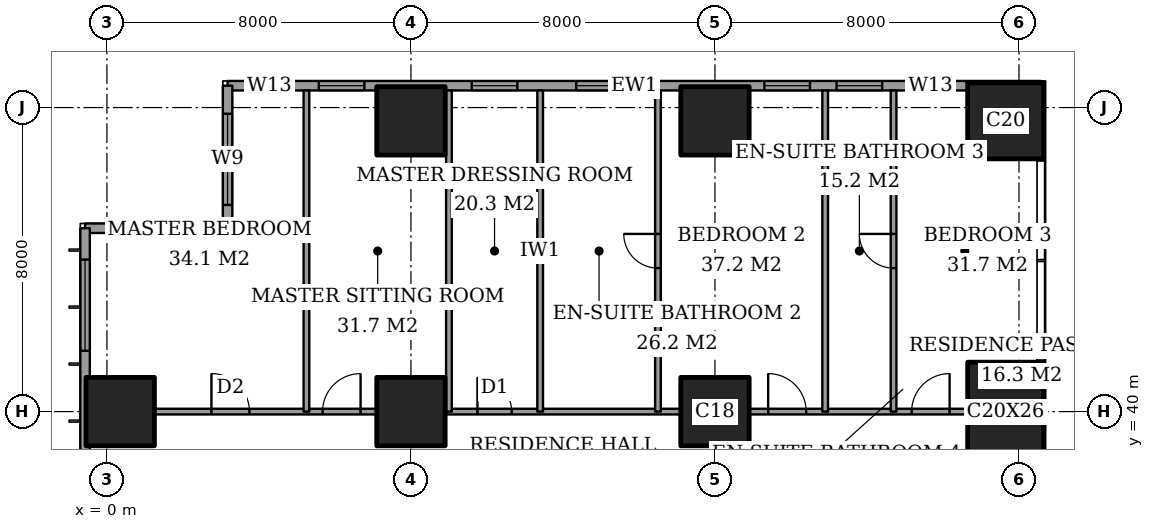
"""IFC4 building model, lengths in metres.
Left out: names, types, materials, properties, quantities, classifications, styles, units other than length and angle.
Written with IfcOpenShell. Run it as: python <this file> out.ifc"""

import sys

from ifc_helpers import new_model, si_unit, direction, frame, frame_2d, origin, origin_2d, place, context, subcontext, project, spatial, rectangle, extrude, element, fill, save


model = new_model("IFC4")
c1 = context("Model", 3, precision=1e-05, world=origin(), true_north=direction((0.0, 1.0)))
c2 = subcontext(c1, "Body", "Model", "MODEL_VIEW")
j1 = project(units=[si_unit("LENGTHUNIT", "METRE"), si_unit("PLANEANGLEUNIT", "RADIAN")], contexts=[c1])
p1 = place(None, origin())
s1 = spatial("IfcSite", under=j1, at=p1, CompositionType="ELEMENT")
p2 = place(p1, origin())
s2 = spatial("IfcBuilding", under=s1, at=p2, CompositionType="ELEMENT")
p3 = place(p2, frame((0.0, 0.0, 189.4)))
s3 = spatial("IfcBuildingStorey", under=s2, at=p3, CompositionType="ELEMENT", Elevation=189.4)
for number, where, z_axis, x_axis in (
    (1, (0.35, 40.0, 0.0), (0.0, 0.0, 1.0), (1.0, 0.0, 0.0)),
    (2, (8.0, 40.0, 0.0), (0.0, 0.0, 1.0), (1.0, 0.0, 0.0)),
    (3, (8.0, 47.65, 0.0), (0.0, 0.0, 1.0), (1.0, 0.0, 0.0)),
    (4, (16.0, 40.0, 0.0), (0.0, 0.0, 1.0), (1.0, 0.0, 0.0)),
    (5, (16.0, 47.65, 0.0), (0.0, 0.0, 1.0), (1.0, 0.0, 0.0)),
):
    element("IfcColumn", number, at=place(p3, frame(where, z_axis=z_axis, x_axis=x_axis)), inside=s3, PredefinedType="COLUMN", context=c2, shape_type="SweptSolid", body=[
        extrude(rectangle(XDim=1.8, YDim=1.8, at=origin_2d()), origin(), (0.0, 0.0, 1.0), 3.6),
    ])
p4 = place(p3, frame((23.65, 40.0, 0.0), z_axis=(0.0, 0.0, 1.0), x_axis=(1.0, 0.0, 0.0)))
e6 = element("IfcColumn", 6, at=p4, inside=s3, PredefinedType="COLUMN", context=c2, shape_type="SweptSolid", body=[
    extrude(rectangle(XDim=2.0, YDim=2.6, at=origin_2d()), origin(), (0.0, 0.0, 1.0), 3.6),
])
p5 = place(p3, frame((23.65, 47.65, 0.0), z_axis=(0.0, 0.0, 1.0), x_axis=(1.0, 0.0, 0.0)))
e7 = element("IfcColumn", 7, at=p5, inside=s3, PredefinedType="COLUMN", context=c2, shape_type="SweptSolid", body=[
    extrude(rectangle(XDim=2.0, YDim=2.0, at=origin_2d()), origin(), (0.0, 0.0, 1.0), 3.6),
])
p6 = place(p3, frame((24.575, 48.575, 0.0), z_axis=(0.0, 0.0, 1.0), x_axis=(-1.0, 0.0, 0.0)))
e8 = element("IfcWall", 8, at=p6, inside=s3, PredefinedType="SOLIDWALL", context=c2, shape_type="SweptSolid", body=[
    extrude(rectangle(XDim=21.4, YDim=0.25, at=frame_2d((10.7, 0.0))), origin(), (0.0, 0.0, 1.0), 3.6),
])
p7 = place(p6, frame((2.3, 0.0, 0.2)))
e9 = element("IfcOpeningElement", 9, at=p7, cuts=e8, PredefinedType="OPENING", context=c2, shape_type="SweptSolid", body=[
    extrude(rectangle(XDim=1.2, YDim=2.4, at=frame_2d((0.6, 1.2))), frame((0.0, 0.135, 0.0), z_axis=(0.0, -1.0, 0.0), x_axis=(1.0, 0.0, 0.0)), (0.0, 0.0, 1.0), 0.27),
])
p8 = place(p6, frame((4.175, 0.0, 0.2)))
e10 = element("IfcOpeningElement", 10, at=p8, cuts=e8, PredefinedType="OPENING", context=c2, shape_type="SweptSolid", body=[
    extrude(rectangle(XDim=1.2, YDim=2.4, at=frame_2d((0.6, 1.2))), frame((0.0, 0.135, 0.0), z_axis=(0.0, -1.0, 0.0), x_axis=(1.0, 0.0, 0.0)), (0.0, 0.0, 1.0), 0.27),
])
p9 = place(p6, frame((6.075, 0.0, 0.2)))
e11 = element("IfcOpeningElement", 11, at=p9, cuts=e8, PredefinedType="OPENING", context=c2, shape_type="SweptSolid", body=[
    extrude(rectangle(XDim=1.2, YDim=2.4, at=frame_2d((0.6, 1.2))), frame((0.0, 0.135, 0.0), z_axis=(0.0, -1.0, 0.0), x_axis=(1.0, 0.0, 0.0)), (0.0, 0.0, 1.0), 0.27),
])
p10 = place(p6, frame((11.025, 0.0, 0.2)))
e12 = element("IfcOpeningElement", 12, at=p10, cuts=e8, PredefinedType="OPENING", context=c2, shape_type="SweptSolid", body=[
    extrude(rectangle(XDim=1.2, YDim=2.4, at=frame_2d((0.6, 1.2))), frame((0.0, 0.135, 0.0), z_axis=(0.0, -1.0, 0.0), x_axis=(1.0, 0.0, 0.0)), (0.0, 0.0, 1.0), 0.27),
])
p11 = place(p6, frame((13.775, 0.0, 0.2)))
e13 = element("IfcOpeningElement", 13, at=p11, cuts=e8, PredefinedType="OPENING", context=c2, shape_type="SweptSolid", body=[
    extrude(rectangle(XDim=1.2, YDim=2.4, at=frame_2d((0.6, 1.2))), frame((0.0, 0.135, 0.0), z_axis=(0.0, -1.0, 0.0), x_axis=(1.0, 0.0, 0.0)), (0.0, 0.0, 1.0), 0.27),
])
p12 = place(p6, frame((17.8, 0.0, 0.2)))
e14 = element("IfcOpeningElement", 14, at=p12, cuts=e8, PredefinedType="OPENING", context=c2, shape_type="SweptSolid", body=[
    extrude(rectangle(XDim=1.2, YDim=2.4, at=frame_2d((0.6, 1.2))), frame((0.0, 0.135, 0.0), z_axis=(0.0, -1.0, 0.0), x_axis=(1.0, 0.0, 0.0)), (0.0, 0.0, 1.0), 0.27),
])
p13 = place(p6, frame((19.7, 0.0, 0.2)))
e15 = element("IfcOpeningElement", 15, at=p13, cuts=e8, PredefinedType="OPENING", context=c2, shape_type="SweptSolid", body=[
    extrude(rectangle(XDim=1.2, YDim=2.4, at=frame_2d((0.6, 1.2))), frame((0.0, 0.135, 0.0), z_axis=(0.0, -1.0, 0.0), x_axis=(1.0, 0.0, 0.0)), (0.0, 0.0, 1.0), 0.27),
])
p14 = place(p3, frame((3.175, 48.575, 0.0), z_axis=(0.0, 0.0, 1.0), x_axis=(0.0, -1.0, 0.0)))
e16 = element("IfcWall", 16, at=p14, inside=s3, PredefinedType="SOLIDWALL", context=c2, shape_type="SweptSolid", body=[
    extrude(rectangle(XDim=3.75, YDim=0.25, at=frame_2d((1.875, 0.0))), origin(), (0.0, 0.0, 1.0), 3.6),
])
p15 = place(p14, frame((0.738, 0.0, 0.2)))
e17 = element("IfcOpeningElement", 17, at=p15, cuts=e16, PredefinedType="OPENING", context=c2, shape_type="SweptSolid", body=[
    extrude(rectangle(XDim=2.4, YDim=2.4, at=frame_2d((1.2, 1.2))), frame((0.0, 0.135, 0.0), z_axis=(0.0, -1.0, 0.0), x_axis=(1.0, 0.0, 0.0)), (0.0, 0.0, 1.0), 0.27),
])
p16 = place(p3, frame((3.175, 44.825, 0.0), z_axis=(0.0, 0.0, 1.0), x_axis=(-1.0, 0.0, 0.0)))
e18 = element("IfcWall", 18, at=p16, inside=s3, PredefinedType="SOLIDWALL", context=c2, shape_type="SweptSolid", body=[
    extrude(rectangle(XDim=3.75, YDim=0.25, at=frame_2d((1.875, 0.0))), origin(), (0.0, 0.0, 1.0), 3.6),
])
p17 = place(p16, frame((0.613, 0.0, 0.2)))
e19 = element("IfcOpeningElement", 19, at=p17, cuts=e18, PredefinedType="OPENING", context=c2, shape_type="SweptSolid", body=[
    extrude(rectangle(XDim=2.4, YDim=2.4, at=frame_2d((1.2, 1.2))), frame((0.0, 0.135, 0.0), z_axis=(0.0, -1.0, 0.0), x_axis=(1.0, 0.0, 0.0)), (0.0, 0.0, 1.0), 0.27),
])
p18 = place(p3, frame((-0.575, 44.825, 0.0), z_axis=(0.0, 0.0, 1.0), x_axis=(0.0, -1.0, 0.0)))
e20 = element("IfcWall", 20, at=p18, inside=s3, PredefinedType="SOLIDWALL", context=c2, shape_type="SweptSolid", body=[
    extrude(rectangle(XDim=41.65, YDim=0.25, at=frame_2d((20.825, 0.0))), origin(), (0.0, 0.0, 1.0), 3.6),
])
p19 = place(p18, frame((0.825, 0.0, 0.2)))
e21 = element("IfcOpeningElement", 21, at=p19, cuts=e20, PredefinedType="OPENING", context=c2, shape_type="SweptSolid", body=[
    extrude(rectangle(XDim=2.4, YDim=2.4, at=frame_2d((1.2, 1.2))), frame((0.0, 0.135, 0.0), z_axis=(0.0, -1.0, 0.0), x_axis=(1.0, 0.0, 0.0)), (0.0, 0.0, 1.0), 0.27),
])
p20 = place(p18, frame((6.05, 0.0, 0.2)))
e22 = element("IfcOpeningElement", 22, at=p20, cuts=e20, PredefinedType="OPENING", context=c2, shape_type="SweptSolid", body=[
    extrude(rectangle(XDim=1.2, YDim=2.4, at=frame_2d((0.6, 1.2))), frame((0.0, 0.135, 0.0), z_axis=(0.0, -1.0, 0.0), x_axis=(1.0, 0.0, 0.0)), (0.0, 0.0, 1.0), 0.27),
])
p21 = place(p18, frame((8.475, 0.0, 0.2)))
e23 = element("IfcOpeningElement", 23, at=p21, cuts=e20, PredefinedType="OPENING", context=c2, shape_type="SweptSolid", body=[
    extrude(rectangle(XDim=2.4, YDim=2.4, at=frame_2d((1.2, 1.2))), frame((0.0, 0.135, 0.0), z_axis=(0.0, -1.0, 0.0), x_axis=(1.0, 0.0, 0.0)), (0.0, 0.0, 1.0), 0.27),
])
p22 = place(p18, frame((15.625, 0.0, 0.2)))
e24 = element("IfcOpeningElement", 24, at=p22, cuts=e20, PredefinedType="OPENING", context=c2, shape_type="SweptSolid", body=[
    extrude(rectangle(XDim=2.4, YDim=2.4, at=frame_2d((1.2, 1.2))), frame((0.0, 0.135, 0.0), z_axis=(0.0, -1.0, 0.0), x_axis=(1.0, 0.0, 0.0)), (0.0, 0.0, 1.0), 0.27),
])
p23 = place(p18, frame((23.625, 0.0, 0.2)))
e25 = element("IfcOpeningElement", 25, at=p23, cuts=e20, PredefinedType="OPENING", context=c2, shape_type="SweptSolid", body=[
    extrude(rectangle(XDim=2.4, YDim=2.4, at=frame_2d((1.2, 1.2))), frame((0.0, 0.135, 0.0), z_axis=(0.0, -1.0, 0.0), x_axis=(1.0, 0.0, 0.0)), (0.0, 0.0, 1.0), 0.27),
])
p24 = place(p18, frame((30.775, 0.0, 0.2)))
e26 = element("IfcOpeningElement", 26, at=p24, cuts=e20, PredefinedType="OPENING", context=c2, shape_type="SweptSolid", body=[
    extrude(rectangle(XDim=2.4, YDim=2.4, at=frame_2d((1.2, 1.2))), frame((0.0, 0.135, 0.0), z_axis=(0.0, -1.0, 0.0), x_axis=(1.0, 0.0, 0.0)), (0.0, 0.0, 1.0), 0.27),
])
p25 = place(p18, frame((34.55, 0.0, 0.2)))
e27 = element("IfcOpeningElement", 27, at=p25, cuts=e20, PredefinedType="OPENING", context=c2, shape_type="SweptSolid", body=[
    extrude(rectangle(XDim=1.2, YDim=2.4, at=frame_2d((0.6, 1.2))), frame((0.0, 0.135, 0.0), z_axis=(0.0, -1.0, 0.0), x_axis=(1.0, 0.0, 0.0)), (0.0, 0.0, 1.0), 0.27),
])
p26 = place(p18, frame((38.425, 0.0, 0.2)))
e28 = element("IfcOpeningElement", 28, at=p26, cuts=e20, PredefinedType="OPENING", context=c2, shape_type="SweptSolid", body=[
    extrude(rectangle(XDim=2.4, YDim=2.4, at=frame_2d((1.2, 1.2))), frame((0.0, 0.135, 0.0), z_axis=(0.0, -1.0, 0.0), x_axis=(1.0, 0.0, 0.0)), (0.0, 0.0, 1.0), 0.27),
])
p27 = place(p3, frame((1.25, 40.0, 0.0), z_axis=(0.0, 0.0, 1.0), x_axis=(1.0, 0.0, 0.0)))
e29 = element("IfcWall", 29, at=p27, inside=s3, PredefinedType="PARTITIONING", context=c2, shape_type="SweptSolid", body=[
    extrude(rectangle(XDim=5.85, YDim=0.15, at=frame_2d((2.925, 0.0))), origin(), (0.0, 0.0, 1.0), 3.35),
])
p28 = place(p27, frame((1.5, 0.0, 0.0)))
e30 = element("IfcOpeningElement", 30, at=p28, cuts=e29, PredefinedType="OPENING", context=c2, shape_type="SweptSolid", body=[
    extrude(rectangle(XDim=1.0, YDim=2.1, at=frame_2d((0.5, 1.05))), frame((0.0, 0.085, 0.0), z_axis=(0.0, -1.0, 0.0), x_axis=(1.0, 0.0, 0.0)), (0.0, 0.0, 1.0), 0.17),
])
p29 = place(p27, frame((4.425, 0.0, 0.0)))
e31 = element("IfcOpeningElement", 31, at=p29, cuts=e29, PredefinedType="OPENING", context=c2, shape_type="SweptSolid", body=[
    extrude(rectangle(XDim=1.0, YDim=2.1, at=frame_2d((0.5, 1.05))), frame((0.0, 0.085, 0.0), z_axis=(0.0, -1.0, 0.0), x_axis=(1.0, 0.0, 0.0)), (0.0, 0.0, 1.0), 0.17),
])
p30 = place(p3, frame((8.9, 40.0, 0.0), z_axis=(0.0, 0.0, 1.0), x_axis=(1.0, 0.0, 0.0)))
e32 = element("IfcWall", 32, at=p30, inside=s3, PredefinedType="PARTITIONING", context=c2, shape_type="SweptSolid", body=[
    extrude(rectangle(XDim=6.2, YDim=0.15, at=frame_2d((3.1, 0.0))), origin(), (0.0, 0.0, 1.0), 3.35),
])
p31 = place(p30, frame((0.85, 0.0, 0.0)))
e33 = element("IfcOpeningElement", 33, at=p31, cuts=e32, PredefinedType="OPENING", context=c2, shape_type="SweptSolid", body=[
    extrude(rectangle(XDim=0.9, YDim=2.1, at=frame_2d((0.45, 1.05))), frame((0.0, 0.085, 0.0), z_axis=(0.0, -1.0, 0.0), x_axis=(1.0, 0.0, 0.0)), (0.0, 0.0, 1.0), 0.17),
])
p32 = place(p3, frame((16.9, 40.0, 0.0), z_axis=(0.0, 0.0, 1.0), x_axis=(1.0, 0.0, 0.0)))
e34 = element("IfcWall", 34, at=p32, inside=s3, PredefinedType="PARTITIONING", context=c2, shape_type="SweptSolid", body=[
    extrude(rectangle(XDim=5.75, YDim=0.15, at=frame_2d((2.875, 0.0))), origin(), (0.0, 0.0, 1.0), 3.35),
])
p33 = place(p32, frame((0.5, 0.0, 0.0)))
e35 = element("IfcOpeningElement", 35, at=p33, cuts=e34, PredefinedType="OPENING", context=c2, shape_type="SweptSolid", body=[
    extrude(rectangle(XDim=1.0, YDim=2.1, at=frame_2d((0.5, 1.05))), frame((0.0, 0.085, 0.0), z_axis=(0.0, -1.0, 0.0), x_axis=(1.0, 0.0, 0.0)), (0.0, 0.0, 1.0), 0.17),
])
p34 = place(p32, frame((4.275, 0.0, 0.0)))
e36 = element("IfcOpeningElement", 36, at=p34, cuts=e34, PredefinedType="OPENING", context=c2, shape_type="SweptSolid", body=[
    extrude(rectangle(XDim=1.0, YDim=2.1, at=frame_2d((0.5, 1.05))), frame((0.0, 0.085, 0.0), z_axis=(0.0, -1.0, 0.0), x_axis=(1.0, 0.0, 0.0)), (0.0, 0.0, 1.0), 0.17),
])
for number, where, z_axis, x_axis in (
    (37, (5.25, 40.0, 0.0), (0.0, 0.0, 1.0), (0.0, 1.0, 0.0)),
    (38, (9.0, 40.0, 0.0), (0.0, 0.0, 1.0), (0.0, 1.0, 0.0)),
    (39, (11.4, 40.0, 0.0), (0.0, 0.0, 1.0), (0.0, 1.0, 0.0)),
):
    element("IfcWall", number, at=place(p3, frame(where, z_axis=z_axis, x_axis=x_axis)), inside=s3, PredefinedType="PARTITIONING", context=c2, shape_type="SweptSolid", body=[
        extrude(rectangle(XDim=8.45, YDim=0.15, at=frame_2d((4.225, 0.0))), origin(), (0.0, 0.0, 1.0), 3.35),
    ])
p35 = place(p3, frame((14.5, 40.0, 0.0), z_axis=(0.0, 0.0, 1.0), x_axis=(0.0, 1.0, 0.0)))
e40 = element("IfcWall", 40, at=p35, inside=s3, PredefinedType="PARTITIONING", context=c2, shape_type="SweptSolid", body=[
    extrude(rectangle(XDim=8.45, YDim=0.15, at=frame_2d((4.225, 0.0))), origin(), (0.0, 0.0, 1.0), 3.35),
])
p36 = place(p35, frame((3.775, 0.0, 0.0)))
e41 = element("IfcOpeningElement", 41, at=p36, cuts=e40, PredefinedType="OPENING", context=c2, shape_type="SweptSolid", body=[
    extrude(rectangle(XDim=0.9, YDim=2.1, at=frame_2d((0.45, 1.05))), frame((0.0, 0.085, 0.0), z_axis=(0.0, -1.0, 0.0), x_axis=(1.0, 0.0, 0.0)), (0.0, 0.0, 1.0), 0.17),
])
p37 = place(p3, frame((18.9, 40.0, 0.0), z_axis=(0.0, 0.0, 1.0), x_axis=(0.0, 1.0, 0.0)))
e42 = element("IfcWall", 42, at=p37, inside=s3, PredefinedType="PARTITIONING", context=c2, shape_type="SweptSolid", body=[
    extrude(rectangle(XDim=8.45, YDim=0.15, at=frame_2d((4.225, 0.0))), origin(), (0.0, 0.0, 1.0), 3.35),
])
p38 = place(p3, frame((20.7, 40.0, 0.0), z_axis=(0.0, 0.0, 1.0), x_axis=(0.0, 1.0, 0.0)))
e43 = element("IfcWall", 43, at=p38, inside=s3, PredefinedType="PARTITIONING", context=c2, shape_type="SweptSolid", body=[
    extrude(rectangle(XDim=8.45, YDim=0.15, at=frame_2d((4.225, 0.0))), origin(), (0.0, 0.0, 1.0), 3.35),
])
p39 = place(p38, frame((3.775, 0.0, 0.0)))
e44 = element("IfcOpeningElement", 44, at=p39, cuts=e43, PredefinedType="OPENING", context=c2, shape_type="SweptSolid", body=[
    extrude(rectangle(XDim=0.9, YDim=2.1, at=frame_2d((0.45, 1.05))), frame((0.0, 0.085, 0.0), z_axis=(0.0, -1.0, 0.0), x_axis=(1.0, 0.0, 0.0)), (0.0, 0.0, 1.0), 0.17),
])
p40 = place(p7, origin())
e45 = element("IfcWindow", 45, at=p40, inside=s3, PartitioningType="SINGLE_PANEL", PredefinedType="WINDOW", context=c2, shape_type="SweptSolid", body=[
    extrude(rectangle(XDim=1.2, YDim=2.4, at=frame_2d((0.6, 1.2))), frame((0.0, 0.03, 0.0), z_axis=(0.0, -1.0, 0.0), x_axis=(1.0, 0.0, 0.0)), (0.0, 0.0, 1.0), 0.06),
])
fill(e9, e45)
p41 = place(p8, origin())
e46 = element("IfcWindow", 46, at=p41, inside=s3, PartitioningType="SINGLE_PANEL", PredefinedType="WINDOW", context=c2, shape_type="SweptSolid", body=[
    extrude(rectangle(XDim=1.2, YDim=2.4, at=frame_2d((0.6, 1.2))), frame((0.0, 0.03, 0.0), z_axis=(0.0, -1.0, 0.0), x_axis=(1.0, 0.0, 0.0)), (0.0, 0.0, 1.0), 0.06),
])
fill(e10, e46)
p42 = place(p9, origin())
e47 = element("IfcWindow", 47, at=p42, inside=s3, PartitioningType="SINGLE_PANEL", PredefinedType="WINDOW", context=c2, shape_type="SweptSolid", body=[
    extrude(rectangle(XDim=1.2, YDim=2.4, at=frame_2d((0.6, 1.2))), frame((0.0, 0.03, 0.0), z_axis=(0.0, -1.0, 0.0), x_axis=(1.0, 0.0, 0.0)), (0.0, 0.0, 1.0), 0.06),
])
fill(e11, e47)
p43 = place(p10, origin())
e48 = element("IfcWindow", 48, at=p43, inside=s3, PartitioningType="SINGLE_PANEL", PredefinedType="WINDOW", context=c2, shape_type="SweptSolid", body=[
    extrude(rectangle(XDim=1.2, YDim=2.4, at=frame_2d((0.6, 1.2))), frame((0.0, 0.03, 0.0), z_axis=(0.0, -1.0, 0.0), x_axis=(1.0, 0.0, 0.0)), (0.0, 0.0, 1.0), 0.06),
])
fill(e12, e48)
p44 = place(p11, origin())
e49 = element("IfcWindow", 49, at=p44, inside=s3, PartitioningType="SINGLE_PANEL", PredefinedType="WINDOW", context=c2, shape_type="SweptSolid", body=[
    extrude(rectangle(XDim=1.2, YDim=2.4, at=frame_2d((0.6, 1.2))), frame((0.0, 0.03, 0.0), z_axis=(0.0, -1.0, 0.0), x_axis=(1.0, 0.0, 0.0)), (0.0, 0.0, 1.0), 0.06),
])
fill(e13, e49)
p45 = place(p12, origin())
e50 = element("IfcWindow", 50, at=p45, inside=s3, PartitioningType="SINGLE_PANEL", PredefinedType="WINDOW", context=c2, shape_type="SweptSolid", body=[
    extrude(rectangle(XDim=1.2, YDim=2.4, at=frame_2d((0.6, 1.2))), frame((0.0, 0.03, 0.0), z_axis=(0.0, -1.0, 0.0), x_axis=(1.0, 0.0, 0.0)), (0.0, 0.0, 1.0), 0.06),
])
fill(e14, e50)
p46 = place(p13, origin())
e51 = element("IfcWindow", 51, at=p46, inside=s3, PartitioningType="SINGLE_PANEL", PredefinedType="WINDOW", context=c2, shape_type="SweptSolid", body=[
    extrude(rectangle(XDim=1.2, YDim=2.4, at=frame_2d((0.6, 1.2))), frame((0.0, 0.03, 0.0), z_axis=(0.0, -1.0, 0.0), x_axis=(1.0, 0.0, 0.0)), (0.0, 0.0, 1.0), 0.06),
])
fill(e15, e51)
p47 = place(p15, origin())
e52 = element("IfcWindow", 52, at=p47, inside=s3, PartitioningType="SINGLE_PANEL", PredefinedType="WINDOW", context=c2, shape_type="SweptSolid", body=[
    extrude(rectangle(XDim=2.4, YDim=2.4, at=frame_2d((1.2, 1.2))), frame((0.0, 0.03, 0.0), z_axis=(0.0, -1.0, 0.0), x_axis=(1.0, 0.0, 0.0)), (0.0, 0.0, 1.0), 0.06),
])
fill(e17, e52)
p48 = place(p17, origin())
e53 = element("IfcWindow", 53, at=p48, inside=s3, PartitioningType="SINGLE_PANEL", PredefinedType="WINDOW", context=c2, shape_type="SweptSolid", body=[
    extrude(rectangle(XDim=2.4, YDim=2.4, at=frame_2d((1.2, 1.2))), frame((0.0, 0.03, 0.0), z_axis=(0.0, -1.0, 0.0), x_axis=(1.0, 0.0, 0.0)), (0.0, 0.0, 1.0), 0.06),
])
fill(e19, e53)
p49 = place(p19, origin())
e54 = element("IfcWindow", 54, at=p49, inside=s3, PartitioningType="SINGLE_PANEL", PredefinedType="WINDOW", context=c2, shape_type="SweptSolid", body=[
    extrude(rectangle(XDim=2.4, YDim=2.4, at=frame_2d((1.2, 1.2))), frame((0.0, 0.03, 0.0), z_axis=(0.0, -1.0, 0.0), x_axis=(1.0, 0.0, 0.0)), (0.0, 0.0, 1.0), 0.06),
])
fill(e21, e54)
p50 = place(p28, origin())
e55 = element("IfcDoor", 55, at=p50, inside=s3, OperationType="SINGLE_SWING_RIGHT", PredefinedType="DOOR", context=c2, shape_type="SweptSolid", body=[
    extrude(rectangle(XDim=1.0, YDim=2.1, at=frame_2d((0.5, 1.05))), frame((0.0, 0.025, 0.0), z_axis=(0.0, -1.0, 0.0), x_axis=(1.0, 0.0, 0.0)), (0.0, 0.0, 1.0), 0.05),
])
fill(e30, e55)
p51 = place(p29, origin())
e56 = element("IfcDoor", 56, at=p51, inside=s3, OperationType="SINGLE_SWING_LEFT", PredefinedType="DOOR", context=c2, shape_type="SweptSolid", body=[
    extrude(rectangle(XDim=1.0, YDim=2.1, at=frame_2d((0.5, 1.05))), frame((0.0, 0.025, 0.0), z_axis=(0.0, -1.0, 0.0), x_axis=(1.0, 0.0, 0.0)), (0.0, 0.0, 1.0), 0.05),
])
fill(e31, e56)
p52 = place(p31, origin())
e57 = element("IfcDoor", 57, at=p52, inside=s3, OperationType="SINGLE_SWING_RIGHT", PredefinedType="DOOR", context=c2, shape_type="SweptSolid", body=[
    extrude(rectangle(XDim=0.9, YDim=2.1, at=frame_2d((0.45, 1.05))), frame((0.0, 0.025, 0.0), z_axis=(0.0, -1.0, 0.0), x_axis=(1.0, 0.0, 0.0)), (0.0, 0.0, 1.0), 0.05),
])
fill(e33, e57)
p53 = place(p36, origin())
e58 = element("IfcDoor", 58, at=p53, inside=s3, OperationType="SINGLE_SWING_LEFT", PredefinedType="DOOR", context=c2, shape_type="SweptSolid", body=[
    extrude(rectangle(XDim=0.9, YDim=2.1, at=frame_2d((0.45, 1.05))), frame((0.0, 0.025, 0.0), z_axis=(0.0, -1.0, 0.0), x_axis=(1.0, 0.0, 0.0)), (0.0, 0.0, 1.0), 0.05),
])
fill(e41, e58)
p54 = place(p33, origin())
e59 = element("IfcDoor", 59, at=p54, inside=s3, OperationType="SINGLE_SWING_RIGHT", PredefinedType="DOOR", context=c2, shape_type="SweptSolid", body=[
    extrude(rectangle(XDim=1.0, YDim=2.1, at=frame_2d((0.5, 1.05))), frame((0.0, 0.025, 0.0), z_axis=(0.0, -1.0, 0.0), x_axis=(1.0, 0.0, 0.0)), (0.0, 0.0, 1.0), 0.05),
])
fill(e35, e59)
p55 = place(p39, origin())
e60 = element("IfcDoor", 60, at=p55, inside=s3, OperationType="SINGLE_SWING_LEFT", PredefinedType="DOOR", context=c2, shape_type="SweptSolid", body=[
    extrude(rectangle(XDim=0.9, YDim=2.1, at=frame_2d((0.45, 1.05))), frame((0.0, 0.025, 0.0), z_axis=(0.0, -1.0, 0.0), x_axis=(1.0, 0.0, 0.0)), (0.0, 0.0, 1.0), 0.05),
])
fill(e44, e60)
p56 = place(p34, origin())
e61 = element("IfcDoor", 61, at=p56, inside=s3, OperationType="SINGLE_SWING_LEFT", PredefinedType="DOOR", context=c2, shape_type="SweptSolid", body=[
    extrude(rectangle(XDim=1.0, YDim=2.1, at=frame_2d((0.5, 1.05))), frame((0.0, 0.025, 0.0), z_axis=(0.0, -1.0, 0.0), x_axis=(1.0, 0.0, 0.0)), (0.0, 0.0, 1.0), 0.05),
])
fill(e36, e61)
save(model, sys.argv[1])
